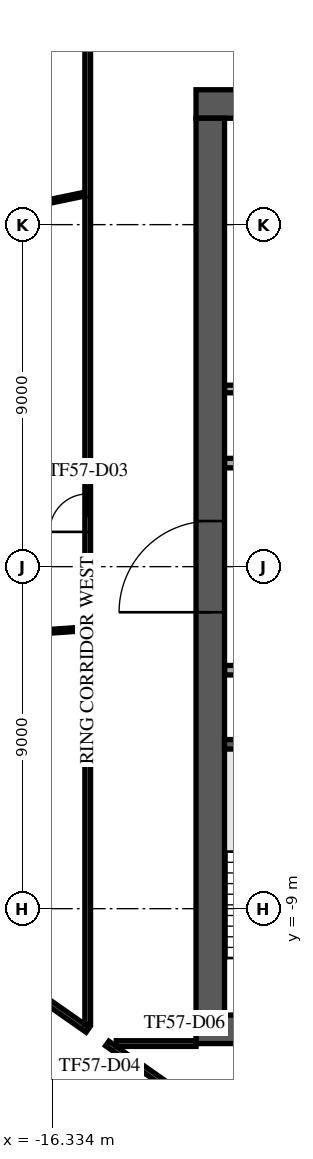
"""IFC4 building model, lengths in metres.
Left out: names, types, materials, properties, quantities, classifications, styles, units other than length and angle.
Written with IfcOpenShell. Run it as: python <this file> out.ifc"""

import sys

from ifc_helpers import new_model, si_unit, direction, frame, frame_2d, origin, place, context, subcontext, project, spatial, rectangle, extrude, element, fill, save


model = new_model("IFC4")
c1 = context("Model", 3, precision=1e-05, world=origin(), true_north=direction((0.0, 1.0)))
c2 = subcontext(c1, "Body", "Model", "MODEL_VIEW")
j1 = project(units=[si_unit("LENGTHUNIT", "METRE"), si_unit("PLANEANGLEUNIT", "RADIAN")], contexts=[c1])
p1 = place(None, origin())
s1 = spatial("IfcSite", under=j1, at=p1, CompositionType="ELEMENT")
p2 = place(p1, origin())
s2 = spatial("IfcBuilding", under=s1, at=p2, CompositionType="ELEMENT")
p3 = place(p2, frame((0.0, 0.0, 246.9)))
s3 = spatial("IfcBuildingStorey", under=s2, at=p3, CompositionType="ELEMENT", Elevation=246.9)
p4 = place(p3, frame((-12.55, 12.175, 0.0), z_axis=(0.0, 0.0, 1.0), x_axis=(1.0, 0.0, 0.0)))
e1 = element("IfcWall", 1, at=p4, inside=s3, PredefinedType="SHEAR", context=c2, shape_type="SweptSolid", body=[
    extrude(rectangle(XDim=25.1, YDim=0.75, at=frame_2d((12.55, 0.0))), origin(), (0.0, 0.0, 1.0), 3.64),
])
p5 = place(p4, frame((11.35, 0.0, 0.0)))
e2 = element("IfcOpeningElement", 2, at=p5, cuts=e1, PredefinedType="OPENING", context=c2, shape_type="SweptSolid", body=[
    extrude(rectangle(XDim=2.4, YDim=2.4, at=frame_2d((1.2, 1.2))), frame((0.0, 0.385, 0.0), z_axis=(0.0, -1.0, 0.0), x_axis=(1.0, 0.0, 0.0)), (0.0, 0.0, 1.0), 0.77),
])
p6 = place(p4, frame((22.175, 0.0, 0.0)))
e3 = element("IfcOpeningElement", 3, at=p6, cuts=e1, PredefinedType="OPENING", context=c2, shape_type="SweptSolid", body=[
    extrude(rectangle(XDim=1.2, YDim=2.1, at=frame_2d((0.6, 1.05))), frame((0.0, 0.385, 0.0), z_axis=(0.0, -1.0, 0.0), x_axis=(1.0, 0.0, 0.0)), (0.0, 0.0, 1.0), 0.77),
])
p7 = place(p4, frame((1.15, 0.0, 0.0)))
e4 = element("IfcOpeningElement", 4, at=p7, cuts=e1, PredefinedType="OPENING", context=c2, shape_type="SweptSolid", body=[
    extrude(rectangle(XDim=1.0, YDim=2.1, at=frame_2d((0.5, 1.05))), frame((0.0, 0.385, 0.0), z_axis=(0.0, -1.0, 0.0), x_axis=(1.0, 0.0, 0.0)), (0.0, 0.0, 1.0), 0.77),
])
p8 = place(p3, frame((-12.55, -12.175, 0.0), z_axis=(0.0, 0.0, 1.0), x_axis=(1.0, 0.0, 0.0)))
e5 = element("IfcWall", 5, at=p8, inside=s3, PredefinedType="SHEAR", context=c2, shape_type="SweptSolid", body=[
    extrude(rectangle(XDim=25.1, YDim=0.75, at=frame_2d((12.55, 0.0))), origin(), (0.0, 0.0, 1.0), 3.64),
])
p9 = place(p8, frame((7.45, 0.0, 0.0)))
e6 = element("IfcOpeningElement", 6, at=p9, cuts=e5, PredefinedType="OPENING", context=c2, shape_type="SweptSolid", body=[
    extrude(rectangle(XDim=2.0, YDim=2.1, at=frame_2d((1.0, 1.05))), frame((0.0, 0.385, 0.0), z_axis=(0.0, -1.0, 0.0), x_axis=(1.0, 0.0, 0.0)), (0.0, 0.0, 1.0), 0.77),
])
p10 = place(p8, frame((17.575, 0.0, 0.0)))
e7 = element("IfcOpeningElement", 7, at=p10, cuts=e5, PredefinedType="OPENING", context=c2, shape_type="SweptSolid", body=[
    extrude(rectangle(XDim=1.2, YDim=2.1, at=frame_2d((0.6, 1.05))), frame((0.0, 0.385, 0.0), z_axis=(0.0, -1.0, 0.0), x_axis=(1.0, 0.0, 0.0)), (0.0, 0.0, 1.0), 0.77),
])
p11 = place(p8, frame((1.725, 0.0, 0.0)))
e8 = element("IfcOpeningElement", 8, at=p11, cuts=e5, PredefinedType="OPENING", context=c2, shape_type="SweptSolid", body=[
    extrude(rectangle(XDim=1.2, YDim=2.1, at=frame_2d((0.6, 1.05))), frame((0.0, 0.385, 0.0), z_axis=(0.0, -1.0, 0.0), x_axis=(1.0, 0.0, 0.0)), (0.0, 0.0, 1.0), 0.77),
])
p12 = place(p8, frame((22.175, 0.0, 0.0)))
e9 = element("IfcOpeningElement", 9, at=p12, cuts=e5, PredefinedType="OPENING", context=c2, shape_type="SweptSolid", body=[
    extrude(rectangle(XDim=1.2, YDim=2.1, at=frame_2d((0.6, 1.05))), frame((0.0, 0.385, 0.0), z_axis=(0.0, -1.0, 0.0), x_axis=(1.0, 0.0, 0.0)), (0.0, 0.0, 1.0), 0.77),
])
p13 = place(p3, frame((-12.175, -11.8, 0.0), z_axis=(0.0, 0.0, 1.0), x_axis=(0.0, 1.0, 0.0)))
e10 = element("IfcWall", 10, at=p13, inside=s3, PredefinedType="SHEAR", context=c2, shape_type="SweptSolid", body=[
    extrude(rectangle(XDim=23.6, YDim=0.75, at=frame_2d((11.8, 0.0))), origin(), (0.0, 0.0, 1.0), 3.64),
])
p14 = place(p13, frame((10.6, 0.0, 0.0)))
e11 = element("IfcOpeningElement", 11, at=p14, cuts=e10, PredefinedType="OPENING", context=c2, shape_type="SweptSolid", body=[
    extrude(rectangle(XDim=2.4, YDim=2.4, at=frame_2d((1.2, 1.2))), frame((0.0, 0.385, 0.0), z_axis=(0.0, -1.0, 0.0), x_axis=(1.0, 0.0, 0.0)), (0.0, 0.0, 1.0), 0.77),
])
p15 = place(p3, frame((-8.65, -4.675, 0.0), z_axis=(0.0, 0.0, 1.0), x_axis=(-1.0, 0.0, 0.0)))
e12 = element("IfcWall", 12, at=p15, inside=s3, PredefinedType="SOLIDWALL", context=c2, shape_type="SweptSolid", body=[
    extrude(rectangle(XDim=3.15, YDim=0.25, at=frame_2d((1.575, 0.0))), origin(), (0.0, 0.0, 1.0), 3.64),
])
p16 = place(p3, frame((-11.795, -2.725, 0.0), z_axis=(0.0, 0.0, 1.0), x_axis=(1.0, 0.0, 0.0)))
e13 = element("IfcWall", 13, at=p16, inside=s3, PredefinedType="PARTITIONING", context=c2, shape_type="SweptSolid", body=[
    extrude(rectangle(XDim=14.415, YDim=0.25, at=frame_2d((7.208, 0.0))), origin(), (0.0, 0.0, 1.0), 3.64),
])
p17 = place(p16, frame((1.295, 0.0, 0.0)))
e14 = element("IfcOpeningElement", 14, at=p17, cuts=e13, PredefinedType="OPENING", context=c2, shape_type="SweptSolid", body=[
    extrude(rectangle(XDim=1.0, YDim=2.1, at=frame_2d((0.5, 1.05))), frame((0.0, 0.135, 0.0), z_axis=(0.0, -1.0, 0.0), x_axis=(1.0, 0.0, 0.0)), (0.0, 0.0, 1.0), 0.27),
])
p18 = place(p16, frame((4.42, 0.0, 0.0)))
e15 = element("IfcOpeningElement", 15, at=p18, cuts=e13, PredefinedType="OPENING", context=c2, shape_type="SweptSolid", body=[
    extrude(rectangle(XDim=1.0, YDim=2.1, at=frame_2d((0.5, 1.05))), frame((0.0, 0.135, 0.0), z_axis=(0.0, -1.0, 0.0), x_axis=(1.0, 0.0, 0.0)), (0.0, 0.0, 1.0), 0.27),
])
p19 = place(p16, frame((9.92, 0.0, 0.0)))
e16 = element("IfcOpeningElement", 16, at=p19, cuts=e13, PredefinedType="OPENING", context=c2, shape_type="SweptSolid", body=[
    extrude(rectangle(XDim=1.0, YDim=2.1, at=frame_2d((0.5, 1.05))), frame((0.0, 0.135, 0.0), z_axis=(0.0, -1.0, 0.0), x_axis=(1.0, 0.0, 0.0)), (0.0, 0.0, 1.0), 0.27),
])
p20 = place(p3, frame((-11.795, 2.725, 0.0), z_axis=(0.0, 0.0, 1.0), x_axis=(1.0, 0.0, 0.0)))
e17 = element("IfcWall", 17, at=p20, inside=s3, PredefinedType="PARTITIONING", context=c2, shape_type="SweptSolid", body=[
    extrude(rectangle(XDim=23.59, YDim=0.25, at=frame_2d((11.795, 0.0))), origin(), (0.0, 0.0, 1.0), 3.64),
])
p21 = place(p20, frame((21.345, 0.0, 0.0)))
e18 = element("IfcOpeningElement", 18, at=p21, cuts=e17, PredefinedType="OPENING", context=c2, shape_type="SweptSolid", body=[
    extrude(rectangle(XDim=0.9, YDim=2.1, at=frame_2d((0.45, 1.05))), frame((0.0, 0.135, 0.0), z_axis=(0.0, -1.0, 0.0), x_axis=(1.0, 0.0, 0.0)), (0.0, 0.0, 1.0), 0.27),
])
p22 = place(p20, frame((1.345, 0.0, 0.0)))
e19 = element("IfcOpeningElement", 19, at=p22, cuts=e17, PredefinedType="OPENING", context=c2, shape_type="SweptSolid", body=[
    extrude(rectangle(XDim=0.9, YDim=2.1, at=frame_2d((0.45, 1.05))), frame((0.0, 0.135, 0.0), z_axis=(0.0, -1.0, 0.0), x_axis=(1.0, 0.0, 0.0)), (0.0, 0.0, 1.0), 0.27),
])
p23 = place(p20, frame((4.42, 0.0, 0.0)))
e20 = element("IfcOpeningElement", 20, at=p23, cuts=e17, PredefinedType="OPENING", context=c2, shape_type="SweptSolid", body=[
    extrude(rectangle(XDim=1.0, YDim=2.1, at=frame_2d((0.5, 1.05))), frame((0.0, 0.135, 0.0), z_axis=(0.0, -1.0, 0.0), x_axis=(1.0, 0.0, 0.0)), (0.0, 0.0, 1.0), 0.27),
])
p24 = place(p20, frame((7.17, 0.0, 0.0)))
e21 = element("IfcOpeningElement", 21, at=p24, cuts=e17, PredefinedType="OPENING", context=c2, shape_type="SweptSolid", body=[
    extrude(rectangle(XDim=1.0, YDim=2.1, at=frame_2d((0.5, 1.05))), frame((0.0, 0.135, 0.0), z_axis=(0.0, -1.0, 0.0), x_axis=(1.0, 0.0, 0.0)), (0.0, 0.0, 1.0), 0.27),
])
p25 = place(p20, frame((12.57, 0.0, 0.0)))
e22 = element("IfcOpeningElement", 22, at=p25, cuts=e17, PredefinedType="OPENING", context=c2, shape_type="SweptSolid", body=[
    extrude(rectangle(XDim=1.2, YDim=2.1, at=frame_2d((0.6, 1.05))), frame((0.0, 0.135, 0.0), z_axis=(0.0, -1.0, 0.0), x_axis=(1.0, 0.0, 0.0)), (0.0, 0.0, 1.0), 0.27),
])
p26 = place(p3, frame((-11.795, 4.675, 0.0), z_axis=(0.0, 0.0, 1.0), x_axis=(1.0, 0.0, 0.0)))
e23 = element("IfcWall", 23, at=p26, inside=s3, PredefinedType="PARTITIONING", context=c2, shape_type="SweptSolid", body=[
    extrude(rectangle(XDim=3.645, YDim=0.2, at=frame_2d((1.823, 0.0))), origin(), (0.0, 0.0, 1.0), 3.64),
])
p27 = place(p3, frame((-5.115, 33.491, 0.0), z_axis=(0.0, 0.0, 1.0), x_axis=(-0.57357740375, -0.819151366908, 0.0)))
e24 = element("IfcWall", 24, at=p27, inside=s3, PredefinedType="STANDARD", context=c2, shape_type="SweptSolid", body=[
    extrude(rectangle(XDim=48.843, YDim=0.6, at=frame_2d((24.422, 0.0))), origin(), (0.0, 0.0, 1.0), 3.64),
])
p28 = place(p27, frame((1.22, 0.0, 0.9)))
e25 = element("IfcOpeningElement", 25, at=p28, cuts=e24, PredefinedType="OPENING", context=c2, shape_type="SweptSolid", body=[
    extrude(rectangle(XDim=2.0, YDim=2.1, at=frame_2d((1.0, 1.05))), frame((0.0, 0.31, 0.0), z_axis=(0.0, -1.0, 0.0), x_axis=(1.0, 0.0, 0.0)), (0.0, 0.0, 1.0), 0.62),
])
p29 = place(p27, frame((5.66, 0.0, 0.9)))
e26 = element("IfcOpeningElement", 26, at=p29, cuts=e24, PredefinedType="OPENING", context=c2, shape_type="SweptSolid", body=[
    extrude(rectangle(XDim=2.0, YDim=2.1, at=frame_2d((1.0, 1.05))), frame((0.0, 0.31, 0.0), z_axis=(0.0, -1.0, 0.0), x_axis=(1.0, 0.0, 0.0)), (0.0, 0.0, 1.0), 0.62),
])
p30 = place(p27, frame((10.101, 0.0, 0.9)))
e27 = element("IfcOpeningElement", 27, at=p30, cuts=e24, PredefinedType="OPENING", context=c2, shape_type="SweptSolid", body=[
    extrude(rectangle(XDim=2.0, YDim=2.1, at=frame_2d((1.0, 1.05))), frame((0.0, 0.31, 0.0), z_axis=(0.0, -1.0, 0.0), x_axis=(1.0, 0.0, 0.0)), (0.0, 0.0, 1.0), 0.62),
])
p31 = place(p27, frame((14.541, 0.0, 0.9)))
e28 = element("IfcOpeningElement", 28, at=p31, cuts=e24, PredefinedType="OPENING", context=c2, shape_type="SweptSolid", body=[
    extrude(rectangle(XDim=2.0, YDim=2.1, at=frame_2d((1.0, 1.05))), frame((0.0, 0.31, 0.0), z_axis=(0.0, -1.0, 0.0), x_axis=(1.0, 0.0, 0.0)), (0.0, 0.0, 1.0), 0.62),
])
p32 = place(p27, frame((18.981, 0.0, 0.9)))
e29 = element("IfcOpeningElement", 29, at=p32, cuts=e24, PredefinedType="OPENING", context=c2, shape_type="SweptSolid", body=[
    extrude(rectangle(XDim=2.0, YDim=2.1, at=frame_2d((1.0, 1.05))), frame((0.0, 0.31, 0.0), z_axis=(0.0, -1.0, 0.0), x_axis=(1.0, 0.0, 0.0)), (0.0, 0.0, 1.0), 0.62),
])
p33 = place(p27, frame((23.422, 0.0, 0.9)))
e30 = element("IfcOpeningElement", 30, at=p33, cuts=e24, PredefinedType="OPENING", context=c2, shape_type="SweptSolid", body=[
    extrude(rectangle(XDim=2.0, YDim=2.1, at=frame_2d((1.0, 1.05))), frame((0.0, 0.31, 0.0), z_axis=(0.0, -1.0, 0.0), x_axis=(1.0, 0.0, 0.0)), (0.0, 0.0, 1.0), 0.62),
])
p34 = place(p27, frame((27.862, 0.0, 0.9)))
e31 = element("IfcOpeningElement", 31, at=p34, cuts=e24, PredefinedType="OPENING", context=c2, shape_type="SweptSolid", body=[
    extrude(rectangle(XDim=2.0, YDim=2.1, at=frame_2d((1.0, 1.05))), frame((0.0, 0.31, 0.0), z_axis=(0.0, -1.0, 0.0), x_axis=(1.0, 0.0, 0.0)), (0.0, 0.0, 1.0), 0.62),
])
p35 = place(p27, frame((32.302, 0.0, 0.9)))
e32 = element("IfcOpeningElement", 32, at=p35, cuts=e24, PredefinedType="OPENING", context=c2, shape_type="SweptSolid", body=[
    extrude(rectangle(XDim=2.0, YDim=2.1, at=frame_2d((1.0, 1.05))), frame((0.0, 0.31, 0.0), z_axis=(0.0, -1.0, 0.0), x_axis=(1.0, 0.0, 0.0)), (0.0, 0.0, 1.0), 0.62),
])
p36 = place(p27, frame((36.742, 0.0, 0.9)))
e33 = element("IfcOpeningElement", 33, at=p36, cuts=e24, PredefinedType="OPENING", context=c2, shape_type="SweptSolid", body=[
    extrude(rectangle(XDim=2.0, YDim=2.1, at=frame_2d((1.0, 1.05))), frame((0.0, 0.31, 0.0), z_axis=(0.0, -1.0, 0.0), x_axis=(1.0, 0.0, 0.0)), (0.0, 0.0, 1.0), 0.62),
])
p37 = place(p27, frame((41.183, 0.0, 0.9)))
e34 = element("IfcOpeningElement", 34, at=p37, cuts=e24, PredefinedType="OPENING", context=c2, shape_type="SweptSolid", body=[
    extrude(rectangle(XDim=2.0, YDim=2.1, at=frame_2d((1.0, 1.05))), frame((0.0, 0.31, 0.0), z_axis=(0.0, -1.0, 0.0), x_axis=(1.0, 0.0, 0.0)), (0.0, 0.0, 1.0), 0.62),
])
p38 = place(p27, frame((45.623, 0.0, 0.9)))
e35 = element("IfcOpeningElement", 35, at=p38, cuts=e24, PredefinedType="OPENING", context=c2, shape_type="SweptSolid", body=[
    extrude(rectangle(XDim=2.0, YDim=2.1, at=frame_2d((1.0, 1.05))), frame((0.0, 0.31, 0.0), z_axis=(0.0, -1.0, 0.0), x_axis=(1.0, 0.0, 0.0)), (0.0, 0.0, 1.0), 0.62),
])
p39 = place(p3, frame((-26.231, -7.537, 0.0), z_axis=(0.0, 0.0, 1.0), x_axis=(0.819166569978, -0.573555690959, 0.0)))
e36 = element("IfcWall", 36, at=p39, inside=s3, PredefinedType="PARTITIONING", context=c2, shape_type="SweptSolid", body=[
    extrude(rectangle(XDim=34.403, YDim=0.15, at=frame_2d((17.201, 0.0))), origin(), (0.0, 0.0, 1.0), 3.24),
])
p40 = place(p39, frame((3.05, 0.0, 0.0)))
e37 = element("IfcOpeningElement", 37, at=p40, cuts=e36, PredefinedType="OPENING", context=c2, shape_type="SweptSolid", body=[
    extrude(rectangle(XDim=1.8, YDim=2.1, at=frame_2d((0.9, 1.05))), frame((0.0, 0.085, 0.0), z_axis=(0.0, -1.0, 0.0), x_axis=(1.0, 0.0, 0.0)), (0.0, 0.0, 1.0), 0.17),
])
p41 = place(p39, frame((13.103, 0.0, 0.0)))
e38 = element("IfcOpeningElement", 38, at=p41, cuts=e36, PredefinedType="OPENING", context=c2, shape_type="SweptSolid", body=[
    extrude(rectangle(XDim=1.0, YDim=2.1, at=frame_2d((0.5, 1.05))), frame((0.0, 0.085, 0.0), z_axis=(0.0, -1.0, 0.0), x_axis=(1.0, 0.0, 0.0)), (0.0, 0.0, 1.0), 0.17),
])
p42 = place(p39, frame((19.173, 0.0, 0.0)))
e39 = element("IfcOpeningElement", 39, at=p42, cuts=e36, PredefinedType="OPENING", context=c2, shape_type="SweptSolid", body=[
    extrude(rectangle(XDim=1.0, YDim=2.1, at=frame_2d((0.5, 1.05))), frame((0.0, 0.085, 0.0), z_axis=(0.0, -1.0, 0.0), x_axis=(1.0, 0.0, 0.0)), (0.0, 0.0, 1.0), 0.17),
])
p43 = place(p3, frame((-24.854, -5.571, 0.0), z_axis=(0.0, 0.0, 1.0), x_axis=(0.819176259714, -0.573541851586, 0.0)))
e40 = element("IfcWall", 40, at=p43, inside=s3, PredefinedType="PARTITIONING", context=c2, shape_type="SweptSolid", body=[
    extrude(rectangle(XDim=11.54, YDim=0.15, at=frame_2d((5.77, 0.0))), origin(), (0.0, 0.0, 1.0), 3.24),
])
p44 = place(p43, frame((6.8, 0.0, 0.0)))
e41 = element("IfcOpeningElement", 41, at=p44, cuts=e40, PredefinedType="OPENING", context=c2, shape_type="SweptSolid", body=[
    extrude(rectangle(XDim=1.0, YDim=2.1, at=frame_2d((0.5, 1.05))), frame((0.0, 0.085, 0.0), z_axis=(0.0, -1.0, 0.0), x_axis=(1.0, 0.0, 0.0)), (0.0, 0.0, 1.0), 0.17),
])
p45 = place(p3, frame((-15.4, -12.046, 0.0), z_axis=(0.0, 0.0, 1.0), x_axis=(0.0, 1.0, 0.0)))
e42 = element("IfcWall", 42, at=p45, inside=s3, PredefinedType="PARTITIONING", context=c2, shape_type="SweptSolid", body=[
    extrude(rectangle(XDim=27.446, YDim=0.15, at=frame_2d((13.723, 0.0))), origin(), (0.0, 0.0, 1.0), 3.24),
])
p46 = place(p45, frame((12.961, 0.0, 0.0)))
e43 = element("IfcOpeningElement", 43, at=p46, cuts=e42, PredefinedType="OPENING", context=c2, shape_type="SweptSolid", body=[
    extrude(rectangle(XDim=1.0, YDim=2.1, at=frame_2d((0.5, 1.05))), frame((0.0, 0.085, 0.0), z_axis=(0.0, -1.0, 0.0), x_axis=(1.0, 0.0, 0.0)), (0.0, 0.0, 1.0), 0.17),
])
p47 = place(p3, frame((-14.886, -12.55, 0.0), z_axis=(0.0, 0.0, 1.0), x_axis=(0.819131763787, -0.57360539882, 0.0)))
e44 = element("IfcWall", 44, at=p47, inside=s3, PredefinedType="PARTITIONING", context=c2, shape_type="SweptSolid", body=[
    extrude(rectangle(XDim=7.559, YDim=0.15, at=frame_2d((3.78, 0.0))), origin(), (0.0, 0.0, 1.0), 3.24),
])
p48 = place(p47, frame((4.3, 0.0, 0.0)))
e45 = element("IfcOpeningElement", 45, at=p48, cuts=e44, PredefinedType="OPENING", context=c2, shape_type="SweptSolid", body=[
    extrude(rectangle(XDim=1.0, YDim=2.1, at=frame_2d((0.5, 1.05))), frame((0.0, 0.085, 0.0), z_axis=(0.0, -1.0, 0.0), x_axis=(1.0, 0.0, 0.0)), (0.0, 0.0, 1.0), 0.17),
])
p49 = place(p3, frame((-14.648, -12.55, 0.0), z_axis=(0.0, 0.0, 1.0), x_axis=(1.0, 0.0, 0.0)))
e46 = element("IfcWall", 46, at=p49, inside=s3, PredefinedType="PARTITIONING", context=c2, shape_type="SweptSolid", body=[
    extrude(rectangle(XDim=2.098, YDim=0.15, at=frame_2d((1.049, 0.0))), origin(), (0.0, 0.0, 1.0), 3.24),
])
p50 = place(p3, frame((-30.057, -2.656, 0.0), z_axis=(0.0, 0.0, 1.0), x_axis=(0.99756824466, 0.069696465096, 0.0)))
e47 = element("IfcWall", 47, at=p50, inside=s3, PredefinedType="PARTITIONING", context=c2, shape_type="SweptSolid", body=[
    extrude(rectangle(XDim=14.614, YDim=0.1, at=frame_2d((7.307, 0.0))), origin(), (0.0, 0.0, 1.0), 3.64),
])
p51 = place(p3, frame((-22.331, 8.378, 0.0), z_axis=(0.0, 0.0, 1.0), x_axis=(0.97903673151, 0.203683770474, 0.0)))
e48 = element("IfcWall", 48, at=p51, inside=s3, PredefinedType="PARTITIONING", context=c2, shape_type="SweptSolid", body=[
    extrude(rectangle(XDim=6.993, YDim=0.1, at=frame_2d((3.496, 0.0))), origin(), (0.0, 0.0, 1.0), 3.64),
])
p52 = place(p14, origin())
e49 = element("IfcDoor", 49, at=p52, inside=s3, OperationType="SINGLE_SWING_LEFT", PredefinedType="DOOR", context=c2, shape_type="SweptSolid", body=[
    extrude(rectangle(XDim=2.4, YDim=2.4, at=frame_2d((1.2, 1.2))), frame((0.0, 0.025, 0.0), z_axis=(0.0, -1.0, 0.0), x_axis=(1.0, 0.0, 0.0)), (0.0, 0.0, 1.0), 0.05),
])
fill(e11, e49)
p53 = place(p46, origin())
e50 = element("IfcDoor", 50, at=p53, inside=s3, OperationType="SINGLE_SWING_LEFT", PredefinedType="DOOR", context=c2, shape_type="SweptSolid", body=[
    extrude(rectangle(XDim=1.0, YDim=2.1, at=frame_2d((0.5, 1.05))), frame((0.0, 0.025, 0.0), z_axis=(0.0, -1.0, 0.0), x_axis=(1.0, 0.0, 0.0)), (0.0, 0.0, 1.0), 0.05),
])
fill(e43, e50)
save(model, sys.argv[1])
